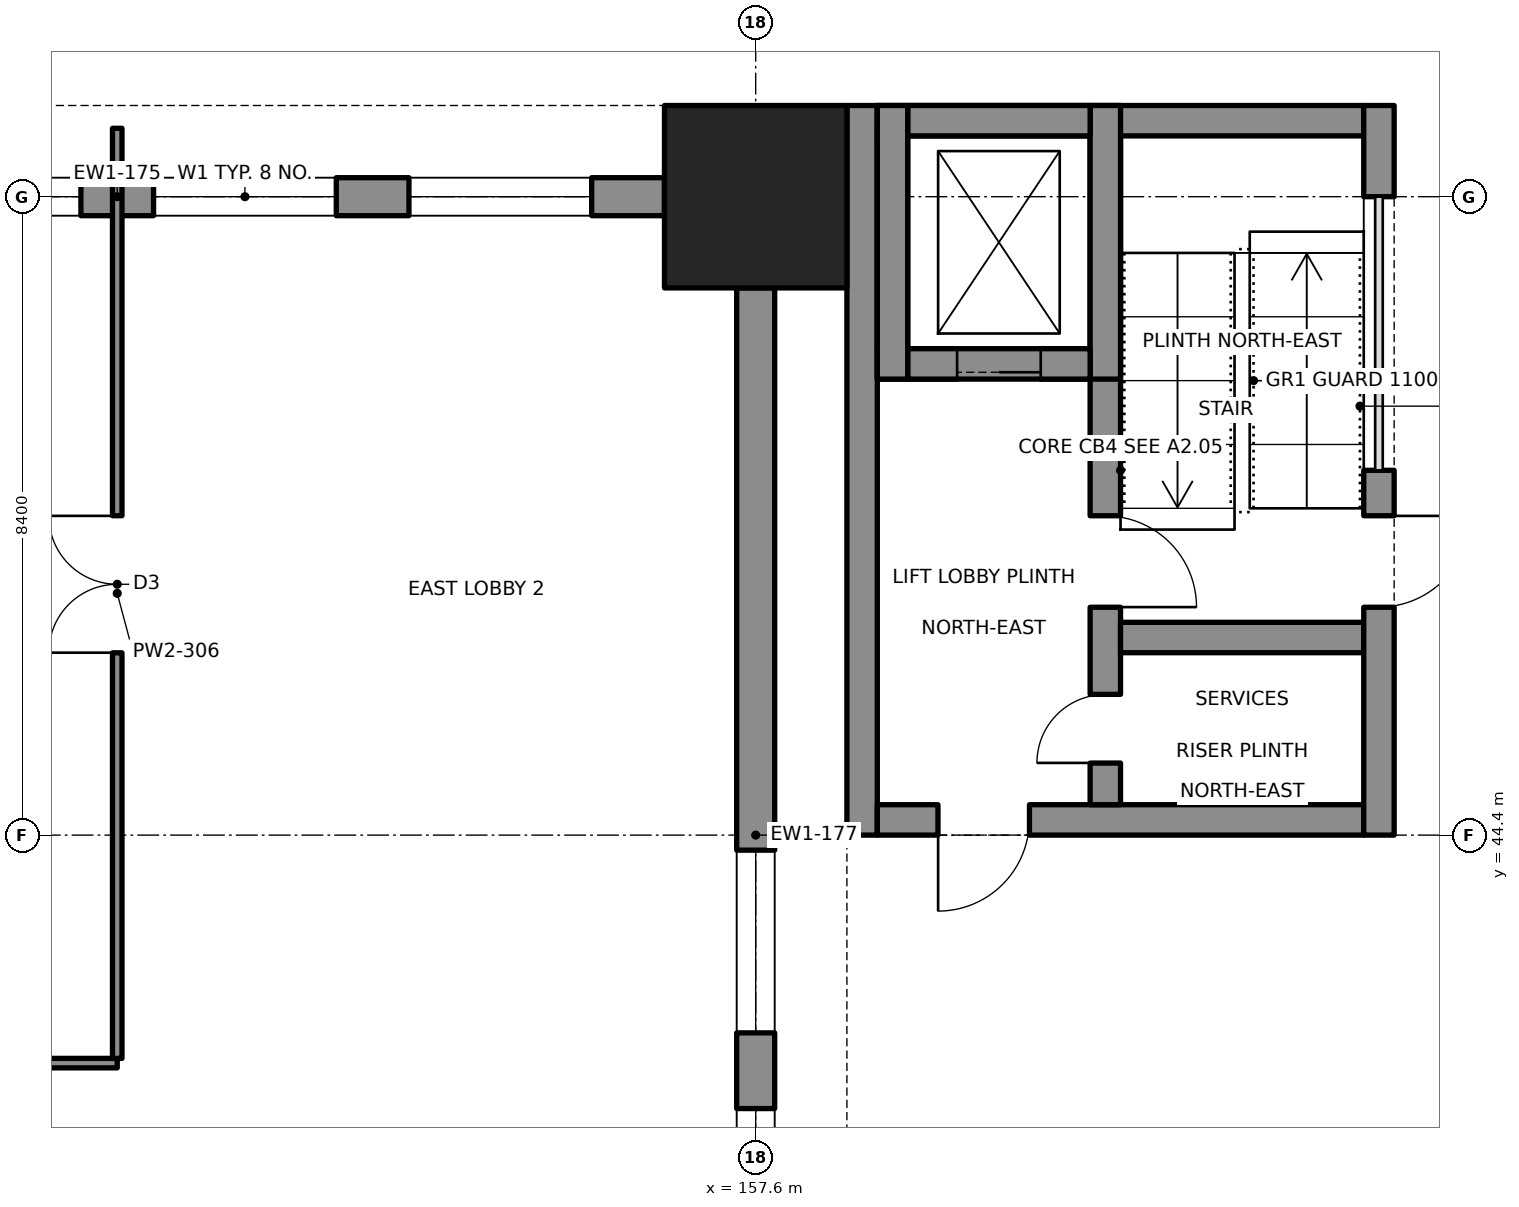
"""IFC4 building model, lengths in metres.
Left out: names, types, materials, properties, quantities, classifications, styles, units other than length and angle.
Written with IfcOpenShell. Run it as: python <this file> out.ifc"""

import sys

from ifc_helpers import new_model, si_unit, direction, frame, frame_2d, origin, origin_2d, place, context, subcontext, project, spatial, rectangle, extrude, element, fill, save


model = new_model("IFC4")
c1 = context("Model", 3, precision=1e-05, world=origin(), true_north=direction((0.0, 1.0)))
c2 = subcontext(c1, "Body", "Model", "MODEL_VIEW")
j1 = project(units=[si_unit("LENGTHUNIT", "METRE"), si_unit("PLANEANGLEUNIT", "RADIAN")], contexts=[c1])
p1 = place(None, origin())
s1 = spatial("IfcSite", under=j1, at=p1, CompositionType="ELEMENT")
p2 = place(p1, origin())
s2 = spatial("IfcBuilding", under=s1, at=p2, CompositionType="ELEMENT")
p3 = place(p2, origin())
s3 = spatial("IfcBuildingStorey", under=s2, at=p3, CompositionType="ELEMENT", Elevation=0.0)
p4 = place(p3, frame((157.6, 52.8, -0.9), z_axis=(0.0, 0.0, 1.0), x_axis=(1.0, 0.0, 0.0)))
e1 = element("IfcColumn", 1, at=p4, inside=s3, PredefinedType="COLUMN", context=c2, shape_type="SweptSolid", body=[
    extrude(rectangle(XDim=2.4, YDim=2.4, at=origin_2d()), origin(), (0.0, 0.0, 1.0), 5.3),
])
p5 = place(p3, frame((142.0, 52.8, 0.0), z_axis=(0.0, 0.0, 1.0), x_axis=(1.0, 0.0, 0.0)))
e2 = element("IfcWall", 2, at=p5, inside=s3, PredefinedType="SOLIDWALL", context=c2, shape_type="SweptSolid", body=[
    extrude(rectangle(XDim=14.4, YDim=0.5, at=frame_2d((7.2, 0.0))), origin(), (0.0, 0.0, 1.0), 3.65),
])
p6 = place(p5, frame((0.96, 0.0, 0.9)))
e3 = element("IfcOpeningElement", 3, at=p6, cuts=e2, PredefinedType="OPENING", context=c2, shape_type="SweptSolid", body=[
    extrude(rectangle(XDim=2.4, YDim=1.8, at=frame_2d((1.2, 0.9))), frame((0.0, 0.26, 0.0), z_axis=(0.0, -1.0, 0.0), x_axis=(1.0, 0.0, 0.0)), (0.0, 0.0, 1.0), 0.52),
])
p7 = place(p5, frame((4.32, 0.0, 0.9)))
e4 = element("IfcOpeningElement", 4, at=p7, cuts=e2, PredefinedType="OPENING", context=c2, shape_type="SweptSolid", body=[
    extrude(rectangle(XDim=2.4, YDim=1.8, at=frame_2d((1.2, 0.9))), frame((0.0, 0.26, 0.0), z_axis=(0.0, -1.0, 0.0), x_axis=(1.0, 0.0, 0.0)), (0.0, 0.0, 1.0), 0.52),
])
p8 = place(p5, frame((7.68, 0.0, 0.9)))
e5 = element("IfcOpeningElement", 5, at=p8, cuts=e2, PredefinedType="OPENING", context=c2, shape_type="SweptSolid", body=[
    extrude(rectangle(XDim=2.4, YDim=1.8, at=frame_2d((1.2, 0.9))), frame((0.0, 0.26, 0.0), z_axis=(0.0, -1.0, 0.0), x_axis=(1.0, 0.0, 0.0)), (0.0, 0.0, 1.0), 0.52),
])
p9 = place(p5, frame((11.04, 0.0, 0.9)))
e6 = element("IfcOpeningElement", 6, at=p9, cuts=e2, PredefinedType="OPENING", context=c2, shape_type="SweptSolid", body=[
    extrude(rectangle(XDim=2.4, YDim=1.8, at=frame_2d((1.2, 0.9))), frame((0.0, 0.26, 0.0), z_axis=(0.0, -1.0, 0.0), x_axis=(1.0, 0.0, 0.0)), (0.0, 0.0, 1.0), 0.52),
])
p10 = place(p3, frame((157.6, 37.2, 0.0), z_axis=(0.0, 0.0, 1.0), x_axis=(0.0, 1.0, 0.0)))
e7 = element("IfcWall", 7, at=p10, inside=s3, PredefinedType="SOLIDWALL", context=c2, shape_type="SweptSolid", body=[
    extrude(rectangle(XDim=14.4, YDim=0.5, at=frame_2d((7.2, 0.0))), origin(), (0.0, 0.0, 1.0), 3.65),
])
p11 = place(p10, frame((1.2, 0.0, 0.9)))
e8 = element("IfcOpeningElement", 8, at=p11, cuts=e7, PredefinedType="OPENING", context=c2, shape_type="SweptSolid", body=[
    extrude(rectangle(XDim=2.4, YDim=1.8, at=frame_2d((1.2, 0.9))), frame((0.0, 0.26, 0.0), z_axis=(0.0, -1.0, 0.0), x_axis=(1.0, 0.0, 0.0)), (0.0, 0.0, 1.0), 0.52),
])
p12 = place(p10, frame((4.6, 0.0, 0.9)))
e9 = element("IfcOpeningElement", 9, at=p12, cuts=e7, PredefinedType="OPENING", context=c2, shape_type="SweptSolid", body=[
    extrude(rectangle(XDim=2.4, YDim=1.8, at=frame_2d((1.2, 0.9))), frame((0.0, 0.26, 0.0), z_axis=(0.0, -1.0, 0.0), x_axis=(1.0, 0.0, 0.0)), (0.0, 0.0, 1.0), 0.52),
])
p13 = place(p3, frame((165.8, 49.2, 0.0), z_axis=(0.0, 0.0, 1.0), x_axis=(0.0, -1.0, 0.0)))
e10 = element("IfcWall", 10, at=p13, inside=s3, PredefinedType="SHEAR", context=c2, shape_type="SweptSolid", body=[
    extrude(rectangle(XDim=4.8, YDim=0.4, at=frame_2d((2.4, 0.0))), origin(), (0.0, 0.0, 1.0), 4.4),
])
p14 = place(p13, frame((0.6, 0.0, 0.0)))
e11 = element("IfcOpeningElement", 11, at=p14, cuts=e10, PredefinedType="OPENING", context=c2, shape_type="SweptSolid", body=[
    extrude(rectangle(XDim=1.2, YDim=2.1, at=frame_2d((0.6, 1.05))), frame((0.0, 0.21, 0.0), z_axis=(0.0, -1.0, 0.0), x_axis=(1.0, 0.0, 0.0)), (0.0, 0.0, 1.0), 0.42),
])
p15 = place(p3, frame((165.8, 54.0, 0.0), z_axis=(0.0, 0.0, 1.0), x_axis=(0.0, -1.0, 0.0)))
e12 = element("IfcWall", 12, at=p15, inside=s3, PredefinedType="SHEAR", context=c2, shape_type="SweptSolid", body=[
    extrude(rectangle(XDim=1.2, YDim=0.4, at=frame_2d((0.6, 0.0))), origin(), (0.0, 0.0, 1.0), 4.4),
])
p16 = place(p3, frame((159.0, 44.4, 0.0), z_axis=(0.0, 0.0, 1.0), x_axis=(0.0, 1.0, 0.0)))
e13 = element("IfcWall", 13, at=p16, inside=s3, PredefinedType="SHEAR", context=c2, shape_type="SweptSolid", body=[
    extrude(rectangle(XDim=9.6, YDim=0.4, at=frame_2d((4.8, 0.0))), origin(), (0.0, 0.0, 1.0), 4.4),
])
p17 = place(p3, frame((159.2, 53.8, 0.0), z_axis=(0.0, 0.0, 1.0), x_axis=(1.0, 0.0, 0.0)))
e14 = element("IfcWall", 14, at=p17, inside=s3, PredefinedType="SHEAR", context=c2, shape_type="SweptSolid", body=[
    extrude(rectangle(XDim=6.4, YDim=0.4, at=frame_2d((3.2, 0.0))), origin(), (0.0, 0.0, 1.0), 4.4),
])
p18 = place(p3, frame((159.2, 44.6, 0.0), z_axis=(0.0, 0.0, 1.0), x_axis=(1.0, 0.0, 0.0)))
e15 = element("IfcWall", 15, at=p18, inside=s3, PredefinedType="SHEAR", context=c2, shape_type="SweptSolid", body=[
    extrude(rectangle(XDim=6.4, YDim=0.4, at=frame_2d((3.2, 0.0))), origin(), (0.0, 0.0, 1.0), 4.4),
])
p19 = place(p18, frame((0.8, 0.0, 0.0)))
e16 = element("IfcOpeningElement", 16, at=p19, cuts=e15, PredefinedType="OPENING", context=c2, shape_type="SweptSolid", body=[
    extrude(rectangle(XDim=1.2, YDim=2.1, at=frame_2d((0.6, 1.05))), frame((0.0, 0.21, 0.0), z_axis=(0.0, -1.0, 0.0), x_axis=(1.0, 0.0, 0.0)), (0.0, 0.0, 1.0), 0.42),
])
p20 = place(p3, frame((162.2, 44.8, 0.0), z_axis=(0.0, 0.0, 1.0), x_axis=(0.0, 1.0, 0.0)))
e17 = element("IfcWall", 17, at=p20, inside=s3, PredefinedType="SHEAR", context=c2, shape_type="SweptSolid", body=[
    extrude(rectangle(XDim=8.8, YDim=0.4, at=frame_2d((4.4, 0.0))), origin(), (0.0, 0.0, 1.0), 4.4),
])
p21 = place(p20, frame((2.6, 0.0, 0.0)))
e18 = element("IfcOpeningElement", 18, at=p21, cuts=e17, PredefinedType="OPENING", context=c2, shape_type="SweptSolid", body=[
    extrude(rectangle(XDim=1.2, YDim=2.1, at=frame_2d((0.6, 1.05))), frame((0.0, 0.21, 0.0), z_axis=(0.0, -1.0, 0.0), x_axis=(1.0, 0.0, 0.0)), (0.0, 0.0, 1.0), 0.42),
])
p22 = place(p20, frame((0.55, 0.0, 0.0)))
e19 = element("IfcOpeningElement", 19, at=p22, cuts=e17, PredefinedType="OPENING", context=c2, shape_type="SweptSolid", body=[
    extrude(rectangle(XDim=0.9, YDim=2.1, at=frame_2d((0.45, 1.05))), frame((0.0, 0.21, 0.0), z_axis=(0.0, -1.0, 0.0), x_axis=(1.0, 0.0, 0.0)), (0.0, 0.0, 1.0), 0.42),
])
p23 = place(p3, frame((162.4, 47.0, 0.0), z_axis=(0.0, 0.0, 1.0), x_axis=(1.0, 0.0, 0.0)))
e20 = element("IfcWall", 20, at=p23, inside=s3, PredefinedType="SHEAR", context=c2, shape_type="SweptSolid", body=[
    extrude(rectangle(XDim=3.2, YDim=0.4, at=frame_2d((1.6, 0.0))), origin(), (0.0, 0.0, 1.0), 4.4),
])
p24 = place(p3, frame((159.2, 50.6, 0.0), z_axis=(0.0, 0.0, 1.0), x_axis=(1.0, 0.0, 0.0)))
e21 = element("IfcWall", 21, at=p24, inside=s3, PredefinedType="SHEAR", context=c2, shape_type="SweptSolid", body=[
    extrude(rectangle(XDim=2.8, YDim=0.4, at=frame_2d((1.4, 0.0))), origin(), (0.0, 0.0, 1.0), 4.4),
])
p25 = place(p24, frame((1.05, 0.0, 0.0)))
e22 = element("IfcOpeningElement", 22, at=p25, cuts=e21, PredefinedType="OPENING", context=c2, shape_type="SweptSolid", body=[
    extrude(rectangle(XDim=1.1, YDim=2.1, at=frame_2d((0.55, 1.05))), frame((0.0, 0.21, 0.0), z_axis=(0.0, -1.0, 0.0), x_axis=(1.0, 0.0, 0.0)), (0.0, 0.0, 1.0), 0.42),
])
p26 = place(p3, frame((159.4, 50.8, 0.0), z_axis=(0.0, 0.0, 1.0), x_axis=(0.0, 1.0, 0.0)))
e23 = element("IfcWall", 23, at=p26, inside=s3, PredefinedType="SHEAR", context=c2, shape_type="SweptSolid", body=[
    extrude(rectangle(XDim=2.8, YDim=0.4, at=frame_2d((1.4, 0.0))), origin(), (0.0, 0.0, 1.0), 4.4),
])
for number, where, z_axis, x_axis in (
    (24, (159.4, 50.4, -1.5), (0.0, 0.0, 1.0), (0.0, 1.0, 0.0)),
    (25, (162.2, 50.4, -1.5), (0.0, 0.0, 1.0), (0.0, 1.0, 0.0)),
):
    element("IfcWall", number, at=place(p3, frame(where, z_axis=z_axis, x_axis=x_axis)), inside=s3, PredefinedType="SHEAR", context=c2, shape_type="SweptSolid", body=[
        extrude(rectangle(XDim=3.6, YDim=0.4, at=frame_2d((1.8, 0.0))), origin(), (0.0, 0.0, 1.0), 1.5),
    ])
for number, where, z_axis, x_axis in (
    (26, (159.6, 50.6, -1.5), (0.0, 0.0, 1.0), (1.0, 0.0, 0.0)),
    (27, (159.6, 53.8, -1.5), (0.0, 0.0, 1.0), (1.0, 0.0, 0.0)),
):
    element("IfcWall", number, at=place(p3, frame(where, z_axis=z_axis, x_axis=x_axis)), inside=s3, PredefinedType="SHEAR", context=c2, shape_type="SweptSolid", body=[
        extrude(rectangle(XDim=2.4, YDim=0.4, at=frame_2d((1.2, 0.0))), origin(), (0.0, 0.0, 1.0), 1.5),
    ])
p27 = place(p3, frame((129.2, 41.4, 0.0), z_axis=(0.0, 0.0, 1.0), x_axis=(1.0, 0.0, 0.0)))
e28 = element("IfcWall", 28, at=p27, inside=s3, PredefinedType="PARTITIONING", context=c2, shape_type="SweptSolid", body=[
    extrude(rectangle(XDim=20.0, YDim=0.125, at=frame_2d((10.0, 0.0))), origin(), (0.0, 0.0, 1.0), 3.65),
])
p28 = place(p27, frame((9.1, 0.0, 0.0)))
e29 = element("IfcOpeningElement", 29, at=p28, cuts=e28, PredefinedType="OPENING", context=c2, shape_type="SweptSolid", body=[
    extrude(rectangle(XDim=1.8, YDim=2.1, at=frame_2d((0.9, 1.05))), frame((0.0, 0.073, 0.0), z_axis=(0.0, -1.0, 0.0), x_axis=(1.0, 0.0, 0.0)), (0.0, 0.0, 1.0), 0.145),
])
p29 = place(p3, frame((149.2, 41.462, 0.0), z_axis=(0.0, 0.0, 1.0), x_axis=(0.0, 1.0, 0.0)))
e30 = element("IfcWall", 30, at=p29, inside=s3, PredefinedType="PARTITIONING", context=c2, shape_type="SweptSolid", body=[
    extrude(rectangle(XDim=12.238, YDim=0.125, at=frame_2d((6.119, 0.0))), origin(), (0.0, 0.0, 1.0), 3.65),
])
p30 = place(p29, frame((5.338, 0.0, 0.0)))
e31 = element("IfcOpeningElement", 31, at=p30, cuts=e30, PredefinedType="OPENING", context=c2, shape_type="SweptSolid", body=[
    extrude(rectangle(XDim=1.8, YDim=2.1, at=frame_2d((0.9, 1.05))), frame((0.0, 0.073, 0.0), z_axis=(0.0, -1.0, 0.0), x_axis=(1.0, 0.0, 0.0)), (0.0, 0.0, 1.0), 0.145),
])
p31 = place(p7, origin())
e32 = element("IfcWindow", 32, at=p31, inside=s3, PartitioningType="SINGLE_PANEL", PredefinedType="WINDOW", context=c2, shape_type="SweptSolid", body=[
    extrude(rectangle(XDim=2.4, YDim=1.8, at=frame_2d((1.2, 0.9))), frame((0.0, 0.03, 0.0), z_axis=(0.0, -1.0, 0.0), x_axis=(1.0, 0.0, 0.0)), (0.0, 0.0, 1.0), 0.06),
])
fill(e4, e32)
p32 = place(p8, origin())
e33 = element("IfcWindow", 33, at=p32, inside=s3, PartitioningType="SINGLE_PANEL", PredefinedType="WINDOW", context=c2, shape_type="SweptSolid", body=[
    extrude(rectangle(XDim=2.4, YDim=1.8, at=frame_2d((1.2, 0.9))), frame((0.0, 0.03, 0.0), z_axis=(0.0, -1.0, 0.0), x_axis=(1.0, 0.0, 0.0)), (0.0, 0.0, 1.0), 0.06),
])
fill(e5, e33)
p33 = place(p9, origin())
e34 = element("IfcWindow", 34, at=p33, inside=s3, PartitioningType="SINGLE_PANEL", PredefinedType="WINDOW", context=c2, shape_type="SweptSolid", body=[
    extrude(rectangle(XDim=2.4, YDim=1.8, at=frame_2d((1.2, 0.9))), frame((0.0, 0.03, 0.0), z_axis=(0.0, -1.0, 0.0), x_axis=(1.0, 0.0, 0.0)), (0.0, 0.0, 1.0), 0.06),
])
fill(e6, e34)
p34 = place(p11, origin())
e35 = element("IfcWindow", 35, at=p34, inside=s3, PartitioningType="SINGLE_PANEL", PredefinedType="WINDOW", context=c2, shape_type="SweptSolid", body=[
    extrude(rectangle(XDim=2.4, YDim=1.8, at=frame_2d((1.2, 0.9))), frame((0.0, 0.03, 0.0), z_axis=(0.0, -1.0, 0.0), x_axis=(1.0, 0.0, 0.0)), (0.0, 0.0, 1.0), 0.06),
])
fill(e8, e35)
p35 = place(p12, origin())
e36 = element("IfcWindow", 36, at=p35, inside=s3, PartitioningType="SINGLE_PANEL", PredefinedType="WINDOW", context=c2, shape_type="SweptSolid", body=[
    extrude(rectangle(XDim=2.4, YDim=1.8, at=frame_2d((1.2, 0.9))), frame((0.0, 0.03, 0.0), z_axis=(0.0, -1.0, 0.0), x_axis=(1.0, 0.0, 0.0)), (0.0, 0.0, 1.0), 0.06),
])
fill(e9, e36)
p36 = place(p14, origin())
e37 = element("IfcDoor", 37, at=p36, inside=s3, OperationType="SINGLE_SWING_LEFT", PredefinedType="DOOR", context=c2, shape_type="SweptSolid", body=[
    extrude(rectangle(XDim=1.2, YDim=2.1, at=frame_2d((0.6, 1.05))), frame((0.0, 0.025, 0.0), z_axis=(0.0, -1.0, 0.0), x_axis=(1.0, 0.0, 0.0)), (0.0, 0.0, 1.0), 0.05),
])
fill(e11, e37)
p37 = place(p19, origin())
e38 = element("IfcDoor", 38, at=p37, inside=s3, OperationType="SINGLE_SWING_LEFT", PredefinedType="DOOR", context=c2, shape_type="SweptSolid", body=[
    extrude(rectangle(XDim=1.2, YDim=2.1, at=frame_2d((0.6, 1.05))), frame((0.0, 0.025, 0.0), z_axis=(0.0, -1.0, 0.0), x_axis=(1.0, 0.0, 0.0)), (0.0, 0.0, 1.0), 0.05),
])
fill(e16, e38)
p38 = place(p21, origin())
e39 = element("IfcDoor", 39, at=p38, inside=s3, OperationType="SINGLE_SWING_LEFT", PredefinedType="DOOR", context=c2, shape_type="SweptSolid", body=[
    extrude(rectangle(XDim=1.2, YDim=2.1, at=frame_2d((0.6, 1.05))), frame((0.0, 0.025, 0.0), z_axis=(0.0, -1.0, 0.0), x_axis=(1.0, 0.0, 0.0)), (0.0, 0.0, 1.0), 0.05),
])
fill(e18, e39)
p39 = place(p22, origin())
e40 = element("IfcDoor", 40, at=p39, inside=s3, OperationType="SINGLE_SWING_LEFT", PredefinedType="DOOR", context=c2, shape_type="SweptSolid", body=[
    extrude(rectangle(XDim=0.9, YDim=2.1, at=frame_2d((0.45, 1.05))), frame((0.0, 0.025, 0.0), z_axis=(0.0, -1.0, 0.0), x_axis=(1.0, 0.0, 0.0)), (0.0, 0.0, 1.0), 0.05),
])
fill(e19, e40)
p40 = place(p25, origin())
e41 = element("IfcDoor", 41, at=p40, inside=s3, OperationType="SLIDING_TO_LEFT", PredefinedType="DOOR", context=c2, shape_type="SweptSolid", body=[
    extrude(rectangle(XDim=1.1, YDim=2.1, at=frame_2d((0.55, 1.05))), frame((0.0, 0.025, 0.0), z_axis=(0.0, -1.0, 0.0), x_axis=(1.0, 0.0, 0.0)), (0.0, 0.0, 1.0), 0.05),
])
fill(e22, e41)
p41 = place(p30, origin())
e42 = element("IfcDoor", 42, at=p41, inside=s3, OperationType="DOUBLE_DOOR_SINGLE_SWING", PredefinedType="DOOR", context=c2, shape_type="SweptSolid", body=[
    extrude(rectangle(XDim=1.8, YDim=2.1, at=frame_2d((0.9, 1.05))), frame((0.0, 0.025, 0.0), z_axis=(0.0, -1.0, 0.0), x_axis=(1.0, 0.0, 0.0)), (0.0, 0.0, 1.0), 0.05),
])
fill(e31, e42)
save(model, sys.argv[1])
